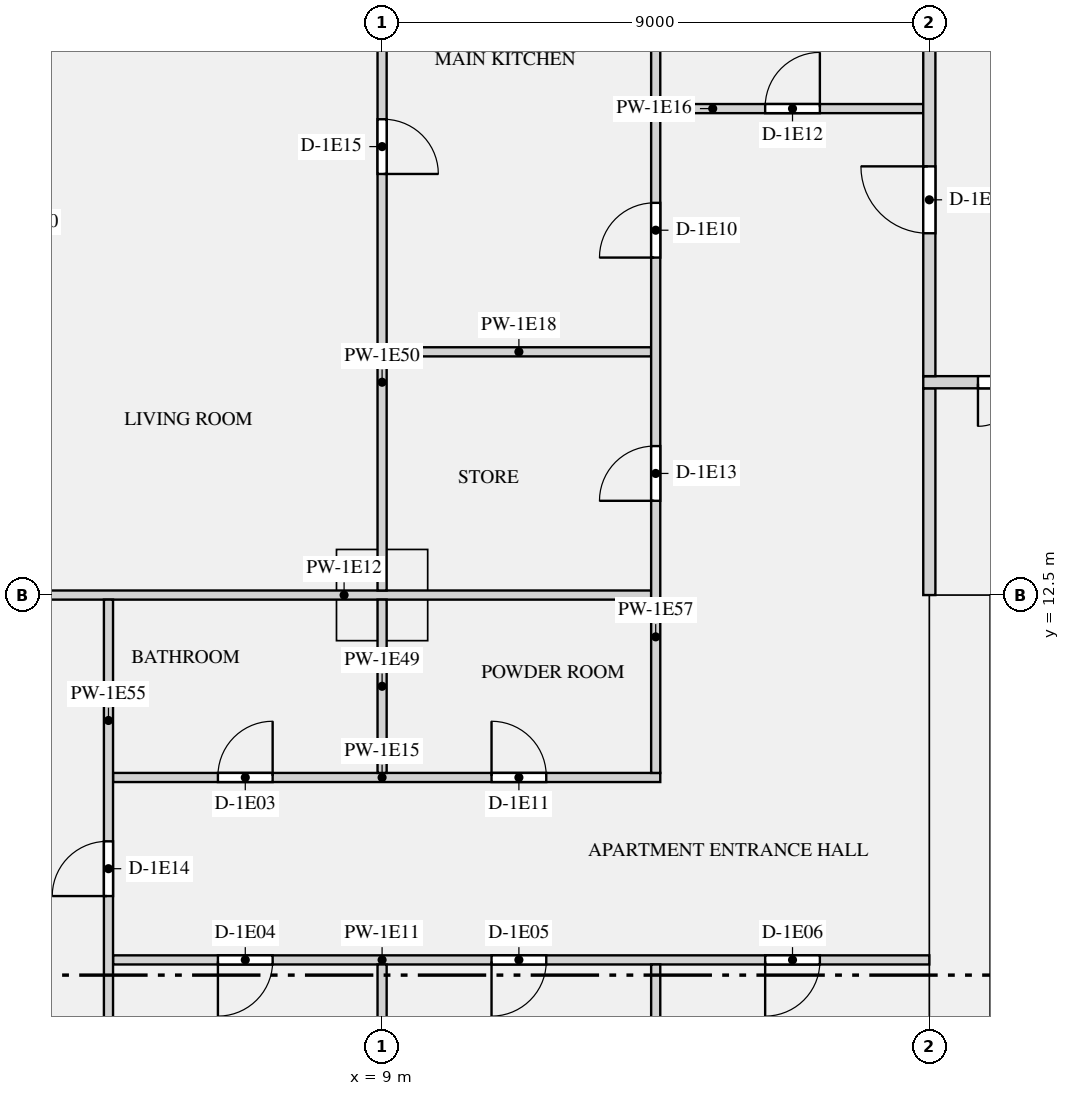
"""IFC4 building model, lengths in metres.
Left out: names, types, materials, properties, quantities, classifications, styles, units other than length and angle.
Written with IfcOpenShell. Run it as: python <this file> out.ifc"""

import sys

from ifc_helpers import new_model, si_unit, direction, frame, frame_2d, origin, origin_2d, place, context, subcontext, project, spatial, rectangle, extrude, element, fill, save


model = new_model("IFC4")
c1 = context("Model", 3, precision=1e-05, world=origin(), true_north=direction((0.0, 1.0)))
c2 = subcontext(c1, "Body", "Model", "MODEL_VIEW")
j1 = project(units=[si_unit("LENGTHUNIT", "METRE"), si_unit("PLANEANGLEUNIT", "RADIAN")], contexts=[c1])
p1 = place(None, origin())
s1 = spatial("IfcSite", under=j1, at=p1, CompositionType="ELEMENT")
p2 = place(p1, origin())
s2 = spatial("IfcBuilding", under=s1, at=p2, CompositionType="ELEMENT")
p3 = place(p2, frame((0.0, 0.0, 54.15)))
s3 = spatial("IfcBuildingStorey", under=s2, at=p3, CompositionType="ELEMENT", Elevation=54.15)
p4 = place(p3, frame((9.0, 12.5, 0.0), z_axis=(0.0, 0.0, 1.0), x_axis=(1.0, 0.0, 0.0)))
e1 = element("IfcColumn", 1, at=p4, inside=s3, PredefinedType="COLUMN", context=c2, shape_type="SweptSolid", body=[
    extrude(rectangle(XDim=1.5, YDim=1.5, at=origin_2d()), origin(), (0.0, 0.0, 1.0), 3.15),
])
p5 = place(p3, frame((18.5, 0.0, 0.0), z_axis=(0.0, 0.0, 1.0), x_axis=(0.0, 1.0, 0.0)))
e2 = element("IfcWall", 2, at=p5, inside=s3, PredefinedType="SHEAR", context=c2, shape_type="SweptSolid", body=[
    extrude(rectangle(XDim=12.5, YDim=1.0, at=frame_2d((6.25, 0.0))), origin(), (0.0, 0.0, 1.0), 3.15),
])
p6 = place(p3, frame((18.0, 12.5, 0.0), z_axis=(0.0, 0.0, 1.0), x_axis=(0.0, 1.0, 0.0)))
e3 = element("IfcWall", 3, at=p6, inside=s3, PredefinedType="PARTITIONING", context=c2, shape_type="SweptSolid", body=[
    extrude(rectangle(XDim=3.4, YDim=0.2, at=frame_2d((1.7, 0.0))), origin(), (0.0, 0.0, 1.0), 2.83),
])
p7 = place(p3, frame((4.575, 6.5, 0.0), z_axis=(0.0, 0.0, 1.0), x_axis=(1.0, 0.0, 0.0)))
e4 = element("IfcWall", 4, at=p7, inside=s3, PredefinedType="PARTITIONING", context=c2, shape_type="SweptSolid", body=[
    extrude(rectangle(XDim=13.425, YDim=0.15, at=frame_2d((6.712, 0.0))), origin(), (0.0, 0.0, 1.0), 2.83),
])
p8 = place(p7, frame((1.725, 0.0, 0.0)))
e5 = element("IfcOpeningElement", 5, at=p8, cuts=e4, PredefinedType="OPENING", context=c2, shape_type="SweptSolid", body=[
    extrude(rectangle(XDim=0.9, YDim=2.1, at=frame_2d((0.45, 1.05))), frame((0.0, 0.085, 0.0), z_axis=(0.0, -1.0, 0.0), x_axis=(1.0, 0.0, 0.0)), (0.0, 0.0, 1.0), 0.17),
])
p9 = place(p7, frame((6.225, 0.0, 0.0)))
e6 = element("IfcOpeningElement", 6, at=p9, cuts=e4, PredefinedType="OPENING", context=c2, shape_type="SweptSolid", body=[
    extrude(rectangle(XDim=0.9, YDim=2.1, at=frame_2d((0.45, 1.05))), frame((0.0, 0.085, 0.0), z_axis=(0.0, -1.0, 0.0), x_axis=(1.0, 0.0, 0.0)), (0.0, 0.0, 1.0), 0.17),
])
p10 = place(p7, frame((10.725, 0.0, 0.0)))
e7 = element("IfcOpeningElement", 7, at=p10, cuts=e4, PredefinedType="OPENING", context=c2, shape_type="SweptSolid", body=[
    extrude(rectangle(XDim=0.9, YDim=2.1, at=frame_2d((0.45, 1.05))), frame((0.0, 0.085, 0.0), z_axis=(0.0, -1.0, 0.0), x_axis=(1.0, 0.0, 0.0)), (0.0, 0.0, 1.0), 0.17),
])
p11 = place(p3, frame((0.8, 12.5, 0.0), z_axis=(0.0, 0.0, 1.0), x_axis=(1.0, 0.0, 0.0)))
e8 = element("IfcWall", 8, at=p11, inside=s3, PredefinedType="PARTITIONING", context=c2, shape_type="SweptSolid", body=[
    extrude(rectangle(XDim=12.625, YDim=0.15, at=frame_2d((6.312, 0.0))), origin(), (0.0, 0.0, 1.0), 2.83),
])
p12 = place(p11, frame((1.025, 0.0, 0.0)))
e9 = element("IfcOpeningElement", 9, at=p12, cuts=e8, PredefinedType="OPENING", context=c2, shape_type="SweptSolid", body=[
    extrude(rectangle(XDim=1.5, YDim=2.1, at=frame_2d((0.75, 1.05))), frame((0.0, 0.085, 0.0), z_axis=(0.0, -1.0, 0.0), x_axis=(1.0, 0.0, 0.0)), (0.0, 0.0, 1.0), 0.17),
])
p13 = place(p3, frame((4.575, 9.5, 0.0), z_axis=(0.0, 0.0, 1.0), x_axis=(1.0, 0.0, 0.0)))
e10 = element("IfcWall", 10, at=p13, inside=s3, PredefinedType="PARTITIONING", context=c2, shape_type="SweptSolid", body=[
    extrude(rectangle(XDim=9.0, YDim=0.15, at=frame_2d((4.5, 0.0))), origin(), (0.0, 0.0, 1.0), 2.83),
])
p14 = place(p13, frame((1.725, 0.0, 0.0)))
e11 = element("IfcOpeningElement", 11, at=p14, cuts=e10, PredefinedType="OPENING", context=c2, shape_type="SweptSolid", body=[
    extrude(rectangle(XDim=0.9, YDim=2.1, at=frame_2d((0.45, 1.05))), frame((0.0, 0.085, 0.0), z_axis=(0.0, -1.0, 0.0), x_axis=(1.0, 0.0, 0.0)), (0.0, 0.0, 1.0), 0.17),
])
p15 = place(p13, frame((6.225, 0.0, 0.0)))
e12 = element("IfcOpeningElement", 12, at=p15, cuts=e10, PredefinedType="OPENING", context=c2, shape_type="SweptSolid", body=[
    extrude(rectangle(XDim=0.9, YDim=2.1, at=frame_2d((0.45, 1.05))), frame((0.0, 0.085, 0.0), z_axis=(0.0, -1.0, 0.0), x_axis=(1.0, 0.0, 0.0)), (0.0, 0.0, 1.0), 0.17),
])
p16 = place(p3, frame((13.575, 20.5, 0.0), z_axis=(0.0, 0.0, 1.0), x_axis=(1.0, 0.0, 0.0)))
e13 = element("IfcWall", 13, at=p16, inside=s3, PredefinedType="PARTITIONING", context=c2, shape_type="SweptSolid", body=[
    extrude(rectangle(XDim=4.325, YDim=0.15, at=frame_2d((2.163, 0.0))), origin(), (0.0, 0.0, 1.0), 2.83),
])
p17 = place(p16, frame((1.725, 0.0, 0.0)))
e14 = element("IfcOpeningElement", 14, at=p17, cuts=e13, PredefinedType="OPENING", context=c2, shape_type="SweptSolid", body=[
    extrude(rectangle(XDim=0.9, YDim=2.1, at=frame_2d((0.45, 1.05))), frame((0.0, 0.085, 0.0), z_axis=(0.0, -1.0, 0.0), x_axis=(1.0, 0.0, 0.0)), (0.0, 0.0, 1.0), 0.17),
])
p18 = place(p3, frame((9.075, 16.5, 0.0), z_axis=(0.0, 0.0, 1.0), x_axis=(1.0, 0.0, 0.0)))
e15 = element("IfcWall", 15, at=p18, inside=s3, PredefinedType="PARTITIONING", context=c2, shape_type="SweptSolid", body=[
    extrude(rectangle(XDim=4.35, YDim=0.15, at=frame_2d((2.175, 0.0))), origin(), (0.0, 0.0, 1.0), 2.83),
])
p19 = place(p3, frame((17.9, 16.0, 0.0), z_axis=(0.0, 0.0, 1.0), x_axis=(1.0, 0.0, 0.0)))
e16 = element("IfcWall", 16, at=p19, inside=s3, PredefinedType="PARTITIONING", context=c2, shape_type="SweptSolid", body=[
    extrude(rectangle(XDim=36.2, YDim=0.2, at=frame_2d((18.1, 0.0))), origin(), (0.0, 0.0, 1.0), 2.83),
])
p20 = place(p19, frame((0.9, 0.0, 0.0)))
e17 = element("IfcOpeningElement", 17, at=p20, cuts=e16, PredefinedType="OPENING", context=c2, shape_type="SweptSolid", body=[
    extrude(rectangle(XDim=1.4, YDim=2.1, at=frame_2d((0.7, 1.05))), frame((0.0, 0.11, 0.0), z_axis=(0.0, -1.0, 0.0), x_axis=(1.0, 0.0, 0.0)), (0.0, 0.0, 1.0), 0.22),
])
p21 = place(p19, frame((33.9, 0.0, 0.0)))
e18 = element("IfcOpeningElement", 18, at=p21, cuts=e16, PredefinedType="OPENING", context=c2, shape_type="SweptSolid", body=[
    extrude(rectangle(XDim=1.4, YDim=2.1, at=frame_2d((0.7, 1.05))), frame((0.0, 0.11, 0.0), z_axis=(0.0, -1.0, 0.0), x_axis=(1.0, 0.0, 0.0)), (0.0, 0.0, 1.0), 0.22),
])
p22 = place(p3, frame((18.0, 16.1, 0.0), z_axis=(0.0, 0.0, 1.0), x_axis=(0.0, 1.0, 0.0)))
e19 = element("IfcWall", 19, at=p22, inside=s3, PredefinedType="PARTITIONING", context=c2, shape_type="SweptSolid", body=[
    extrude(rectangle(XDim=7.8, YDim=0.2, at=frame_2d((3.9, 0.0))), origin(), (0.0, 0.0, 1.0), 2.83),
])
p23 = place(p22, frame((2.35, 0.0, 0.0)))
e20 = element("IfcOpeningElement", 20, at=p23, cuts=e19, PredefinedType="OPENING", context=c2, shape_type="SweptSolid", body=[
    extrude(rectangle(XDim=1.1, YDim=2.1, at=frame_2d((0.55, 1.05))), frame((0.0, 0.11, 0.0), z_axis=(0.0, -1.0, 0.0), x_axis=(1.0, 0.0, 0.0)), (0.0, 0.0, 1.0), 0.22),
])
p24 = place(p3, frame((9.0, 0.8, 0.0), z_axis=(0.0, 0.0, 1.0), x_axis=(0.0, 1.0, 0.0)))
e21 = element("IfcWall", 21, at=p24, inside=s3, PredefinedType="PARTITIONING", context=c2, shape_type="SweptSolid", body=[
    extrude(rectangle(XDim=5.625, YDim=0.15, at=frame_2d((2.812, 0.0))), origin(), (0.0, 0.0, 1.0), 2.83),
])
p25 = place(p3, frame((9.0, 9.575, 0.0), z_axis=(0.0, 0.0, 1.0), x_axis=(0.0, 1.0, 0.0)))
e22 = element("IfcWall", 22, at=p25, inside=s3, PredefinedType="PARTITIONING", context=c2, shape_type="SweptSolid", body=[
    extrude(rectangle(XDim=2.85, YDim=0.15, at=frame_2d((1.425, 0.0))), origin(), (0.0, 0.0, 1.0), 2.83),
])
p26 = place(p3, frame((9.0, 12.575, 0.0), z_axis=(0.0, 0.0, 1.0), x_axis=(0.0, 1.0, 0.0)))
e23 = element("IfcWall", 23, at=p26, inside=s3, PredefinedType="PARTITIONING", context=c2, shape_type="SweptSolid", body=[
    extrude(rectangle(XDim=11.35, YDim=0.15, at=frame_2d((5.675, 0.0))), origin(), (0.0, 0.0, 1.0), 2.83),
])
p27 = place(p26, frame((6.85, 0.0, 0.0)))
e24 = element("IfcOpeningElement", 24, at=p27, cuts=e23, PredefinedType="OPENING", context=c2, shape_type="SweptSolid", body=[
    extrude(rectangle(XDim=0.9, YDim=2.1, at=frame_2d((0.45, 1.05))), frame((0.0, 0.085, 0.0), z_axis=(0.0, -1.0, 0.0), x_axis=(1.0, 0.0, 0.0)), (0.0, 0.0, 1.0), 0.17),
])
p28 = place(p3, frame((4.5, 5.3, 0.0), z_axis=(0.0, 0.0, 1.0), x_axis=(0.0, 1.0, 0.0)))
e25 = element("IfcWall", 25, at=p28, inside=s3, PredefinedType="PARTITIONING", context=c2, shape_type="SweptSolid", body=[
    extrude(rectangle(XDim=7.125, YDim=0.15, at=frame_2d((3.562, 0.0))), origin(), (0.0, 0.0, 1.0), 2.83),
])
p29 = place(p28, frame((2.25, 0.0, 0.0)))
e26 = element("IfcOpeningElement", 26, at=p29, cuts=e25, PredefinedType="OPENING", context=c2, shape_type="SweptSolid", body=[
    extrude(rectangle(XDim=0.9, YDim=2.1, at=frame_2d((0.45, 1.05))), frame((0.0, 0.085, 0.0), z_axis=(0.0, -1.0, 0.0), x_axis=(1.0, 0.0, 0.0)), (0.0, 0.0, 1.0), 0.17),
])
p30 = place(p3, frame((13.5, 0.8, 0.0), z_axis=(0.0, 0.0, 1.0), x_axis=(0.0, 1.0, 0.0)))
e27 = element("IfcWall", 27, at=p30, inside=s3, PredefinedType="PARTITIONING", context=c2, shape_type="SweptSolid", body=[
    extrude(rectangle(XDim=5.625, YDim=0.15, at=frame_2d((2.812, 0.0))), origin(), (0.0, 0.0, 1.0), 2.83),
])
p31 = place(p3, frame((13.5, 9.575, 0.0), z_axis=(0.0, 0.0, 1.0), x_axis=(0.0, 1.0, 0.0)))
e28 = element("IfcWall", 28, at=p31, inside=s3, PredefinedType="PARTITIONING", context=c2, shape_type="SweptSolid", body=[
    extrude(rectangle(XDim=13.325, YDim=0.15, at=frame_2d((6.663, 0.0))), origin(), (0.0, 0.0, 1.0), 2.83),
])
p32 = place(p31, frame((8.475, 0.0, 0.0)))
e29 = element("IfcOpeningElement", 29, at=p32, cuts=e28, PredefinedType="OPENING", context=c2, shape_type="SweptSolid", body=[
    extrude(rectangle(XDim=0.9, YDim=2.1, at=frame_2d((0.45, 1.05))), frame((0.0, 0.085, 0.0), z_axis=(0.0, -1.0, 0.0), x_axis=(1.0, 0.0, 0.0)), (0.0, 0.0, 1.0), 0.17),
])
p33 = place(p31, frame((4.475, 0.0, 0.0)))
e30 = element("IfcOpeningElement", 30, at=p33, cuts=e28, PredefinedType="OPENING", context=c2, shape_type="SweptSolid", body=[
    extrude(rectangle(XDim=0.9, YDim=2.1, at=frame_2d((0.45, 1.05))), frame((0.0, 0.085, 0.0), z_axis=(0.0, -1.0, 0.0), x_axis=(1.0, 0.0, 0.0)), (0.0, 0.0, 1.0), 0.17),
])
p34 = place(p20, frame((1.4, 0.0, 0.0), z_axis=(0.0, 0.0, 1.0), x_axis=(-1.0, 0.0, 0.0)))
e31 = element("IfcDoor", 31, at=p34, inside=s3, OperationType="DOUBLE_DOOR_SINGLE_SWING", PredefinedType="DOOR", context=c2, shape_type="SweptSolid", body=[
    extrude(rectangle(XDim=1.4, YDim=2.1, at=frame_2d((0.7, 1.05))), frame((0.0, 0.025, 0.0), z_axis=(0.0, -1.0, 0.0), x_axis=(1.0, 0.0, 0.0)), (0.0, 0.0, 1.0), 0.05),
])
fill(e17, e31)
p35 = place(p14, origin())
e32 = element("IfcDoor", 32, at=p35, inside=s3, OperationType="SINGLE_SWING_RIGHT", PredefinedType="DOOR", context=c2, shape_type="SweptSolid", body=[
    extrude(rectangle(XDim=0.9, YDim=2.1, at=frame_2d((0.45, 1.05))), frame((0.0, 0.025, 0.0), z_axis=(0.0, -1.0, 0.0), x_axis=(1.0, 0.0, 0.0)), (0.0, 0.0, 1.0), 0.05),
])
fill(e11, e32)
p36 = place(p8, frame((0.9, 0.0, 0.0), z_axis=(0.0, 0.0, 1.0), x_axis=(-1.0, 0.0, 0.0)))
e33 = element("IfcDoor", 33, at=p36, inside=s3, OperationType="SINGLE_SWING_RIGHT", PredefinedType="DOOR", context=c2, shape_type="SweptSolid", body=[
    extrude(rectangle(XDim=0.9, YDim=2.1, at=frame_2d((0.45, 1.05))), frame((0.0, 0.025, 0.0), z_axis=(0.0, -1.0, 0.0), x_axis=(1.0, 0.0, 0.0)), (0.0, 0.0, 1.0), 0.05),
])
fill(e5, e33)
p37 = place(p9, frame((0.9, 0.0, 0.0), z_axis=(0.0, 0.0, 1.0), x_axis=(-1.0, 0.0, 0.0)))
e34 = element("IfcDoor", 34, at=p37, inside=s3, OperationType="SINGLE_SWING_RIGHT", PredefinedType="DOOR", context=c2, shape_type="SweptSolid", body=[
    extrude(rectangle(XDim=0.9, YDim=2.1, at=frame_2d((0.45, 1.05))), frame((0.0, 0.025, 0.0), z_axis=(0.0, -1.0, 0.0), x_axis=(1.0, 0.0, 0.0)), (0.0, 0.0, 1.0), 0.05),
])
fill(e6, e34)
p38 = place(p10, frame((0.9, 0.0, 0.0), z_axis=(0.0, 0.0, 1.0), x_axis=(-1.0, 0.0, 0.0)))
e35 = element("IfcDoor", 35, at=p38, inside=s3, OperationType="SINGLE_SWING_RIGHT", PredefinedType="DOOR", context=c2, shape_type="SweptSolid", body=[
    extrude(rectangle(XDim=0.9, YDim=2.1, at=frame_2d((0.45, 1.05))), frame((0.0, 0.025, 0.0), z_axis=(0.0, -1.0, 0.0), x_axis=(1.0, 0.0, 0.0)), (0.0, 0.0, 1.0), 0.05),
])
fill(e7, e35)
p39 = place(p32, origin())
e36 = element("IfcDoor", 36, at=p39, inside=s3, OperationType="SINGLE_SWING_LEFT", PredefinedType="DOOR", context=c2, shape_type="SweptSolid", body=[
    extrude(rectangle(XDim=0.9, YDim=2.1, at=frame_2d((0.45, 1.05))), frame((0.0, 0.025, 0.0), z_axis=(0.0, -1.0, 0.0), x_axis=(1.0, 0.0, 0.0)), (0.0, 0.0, 1.0), 0.05),
])
fill(e29, e36)
p40 = place(p15, origin())
e37 = element("IfcDoor", 37, at=p40, inside=s3, OperationType="SINGLE_SWING_LEFT", PredefinedType="DOOR", context=c2, shape_type="SweptSolid", body=[
    extrude(rectangle(XDim=0.9, YDim=2.1, at=frame_2d((0.45, 1.05))), frame((0.0, 0.025, 0.0), z_axis=(0.0, -1.0, 0.0), x_axis=(1.0, 0.0, 0.0)), (0.0, 0.0, 1.0), 0.05),
])
fill(e12, e37)
p41 = place(p17, origin())
e38 = element("IfcDoor", 38, at=p41, inside=s3, OperationType="SINGLE_SWING_RIGHT", PredefinedType="DOOR", context=c2, shape_type="SweptSolid", body=[
    extrude(rectangle(XDim=0.9, YDim=2.1, at=frame_2d((0.45, 1.05))), frame((0.0, 0.025, 0.0), z_axis=(0.0, -1.0, 0.0), x_axis=(1.0, 0.0, 0.0)), (0.0, 0.0, 1.0), 0.05),
])
fill(e14, e38)
p42 = place(p33, origin())
e39 = element("IfcDoor", 39, at=p42, inside=s3, OperationType="SINGLE_SWING_LEFT", PredefinedType="DOOR", context=c2, shape_type="SweptSolid", body=[
    extrude(rectangle(XDim=0.9, YDim=2.1, at=frame_2d((0.45, 1.05))), frame((0.0, 0.025, 0.0), z_axis=(0.0, -1.0, 0.0), x_axis=(1.0, 0.0, 0.0)), (0.0, 0.0, 1.0), 0.05),
])
fill(e30, e39)
p43 = place(p29, origin())
e40 = element("IfcDoor", 40, at=p43, inside=s3, OperationType="SINGLE_SWING_LEFT", PredefinedType="DOOR", context=c2, shape_type="SweptSolid", body=[
    extrude(rectangle(XDim=0.9, YDim=2.1, at=frame_2d((0.45, 1.05))), frame((0.0, 0.025, 0.0), z_axis=(0.0, -1.0, 0.0), x_axis=(1.0, 0.0, 0.0)), (0.0, 0.0, 1.0), 0.05),
])
fill(e26, e40)
p44 = place(p27, frame((0.9, 0.0, 0.0), z_axis=(0.0, 0.0, 1.0), x_axis=(-1.0, 0.0, 0.0)))
e41 = element("IfcDoor", 41, at=p44, inside=s3, OperationType="SINGLE_SWING_RIGHT", PredefinedType="DOOR", context=c2, shape_type="SweptSolid", body=[
    extrude(rectangle(XDim=0.9, YDim=2.1, at=frame_2d((0.45, 1.05))), frame((0.0, 0.025, 0.0), z_axis=(0.0, -1.0, 0.0), x_axis=(1.0, 0.0, 0.0)), (0.0, 0.0, 1.0), 0.05),
])
fill(e24, e41)
p45 = place(p23, origin())
e42 = element("IfcDoor", 42, at=p45, inside=s3, OperationType="SINGLE_SWING_RIGHT", PredefinedType="DOOR", context=c2, shape_type="SweptSolid", body=[
    extrude(rectangle(XDim=1.1, YDim=2.1, at=frame_2d((0.55, 1.05))), frame((0.0, 0.025, 0.0), z_axis=(0.0, -1.0, 0.0), x_axis=(1.0, 0.0, 0.0)), (0.0, 0.0, 1.0), 0.05),
])
fill(e20, e42)
save(model, sys.argv[1])
